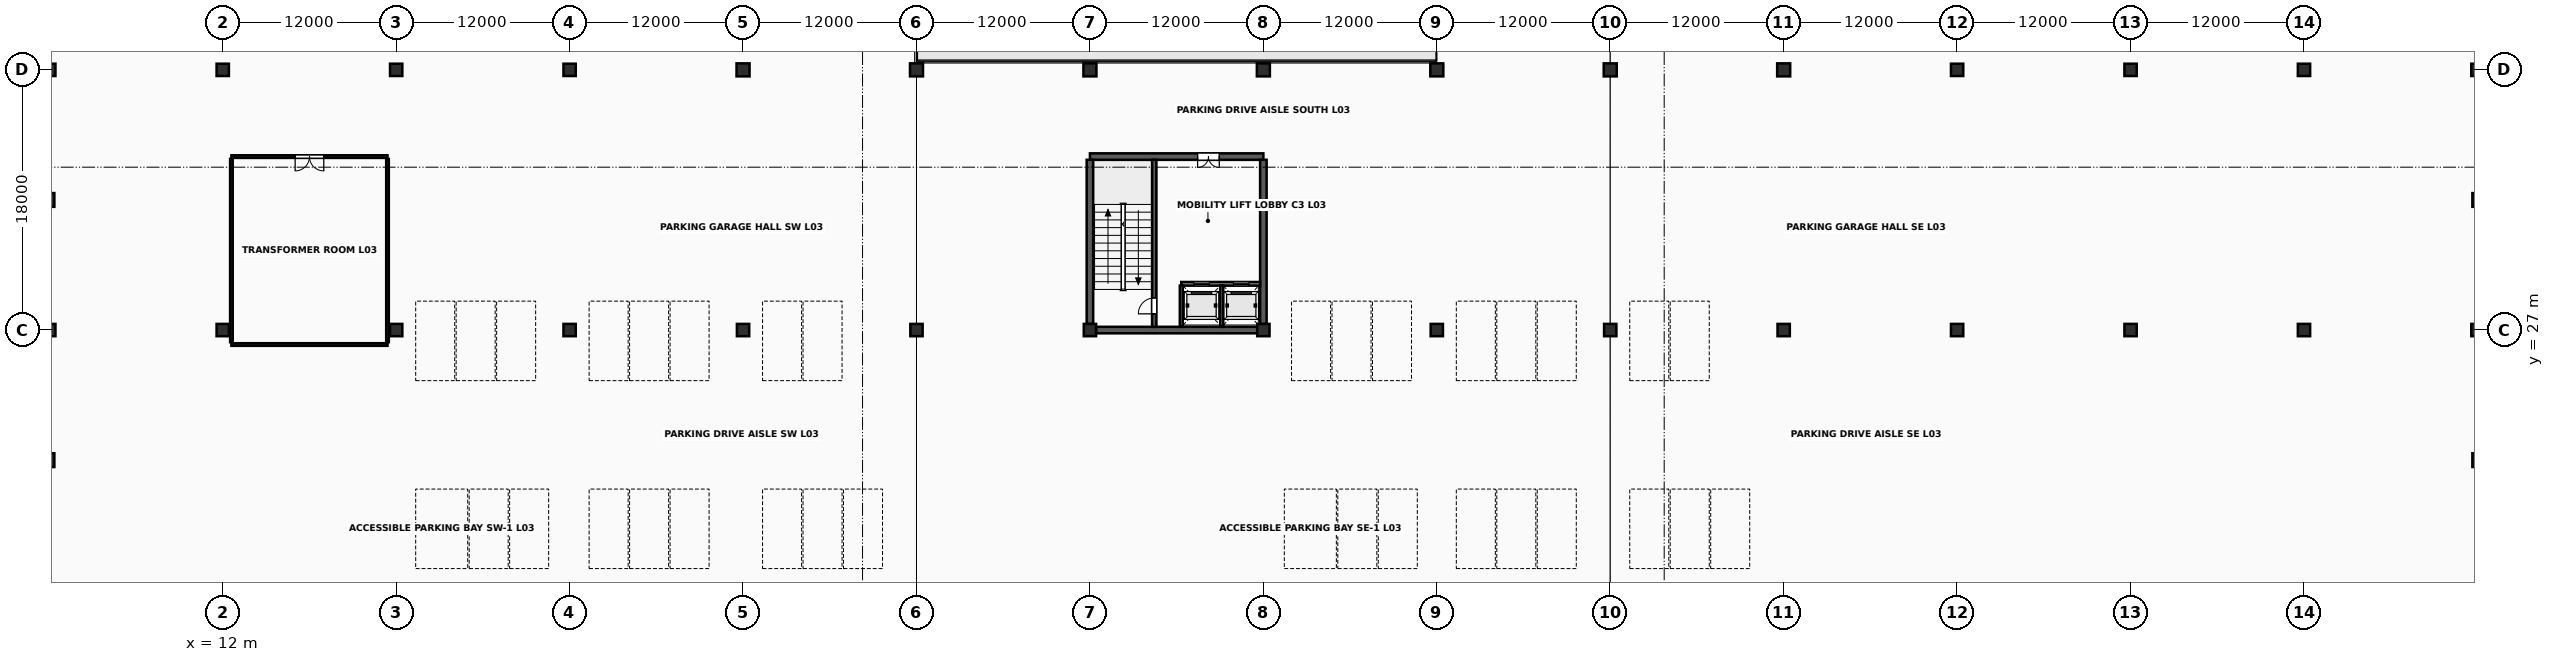
"""IFC4 building model, lengths in metres.
Left out: names, types, materials, properties, quantities, classifications, styles, units other than length and angle.
Written with IfcOpenShell. Run it as: python <this file> out.ifc"""

import sys

from ifc_helpers import new_model, si_unit, direction, frame, frame_2d, origin, origin_2d, place, context, subcontext, project, spatial, rectangle, extrude, element, fill, save


model = new_model("IFC4")
c1 = context("Model", 3, precision=1e-05, world=origin(), true_north=direction((0.0, 1.0)))
c2 = subcontext(c1, "Body", "Model", "MODEL_VIEW")
j1 = project(units=[si_unit("LENGTHUNIT", "METRE"), si_unit("PLANEANGLEUNIT", "RADIAN")], contexts=[c1])
p1 = place(None, origin())
s1 = spatial("IfcSite", under=j1, at=p1, CompositionType="ELEMENT")
p2 = place(p1, origin())
s2 = spatial("IfcBuilding", under=s1, at=p2, CompositionType="ELEMENT")
p3 = place(p2, frame((0.0, 0.0, 13.4)))
s3 = spatial("IfcBuildingStorey", under=s2, at=p3, CompositionType="ELEMENT", Elevation=13.4)
for number, where, z_axis, x_axis in (
    (1, (0.0, 27.0, 0.0), (0.0, 0.0, 1.0), (1.0, 0.0, 0.0)),
    (2, (0.0, 45.0, 0.0), (0.0, 0.0, 1.0), (1.0, 0.0, 0.0)),
    (3, (12.0, 27.0, 0.0), (0.0, 0.0, 1.0), (1.0, 0.0, 0.0)),
    (4, (12.0, 45.0, 0.0), (0.0, 0.0, 1.0), (1.0, 0.0, 0.0)),
    (5, (24.0, 27.0, 0.0), (0.0, 0.0, 1.0), (1.0, 0.0, 0.0)),
    (6, (24.0, 45.0, 0.0), (0.0, 0.0, 1.0), (1.0, 0.0, 0.0)),
    (7, (36.0, 27.0, 0.0), (0.0, 0.0, 1.0), (1.0, 0.0, 0.0)),
    (8, (36.0, 45.0, 0.0), (0.0, 0.0, 1.0), (1.0, 0.0, 0.0)),
    (9, (48.0, 27.0, 0.0), (0.0, 0.0, 1.0), (1.0, 0.0, 0.0)),
):
    element("IfcColumn", number, at=place(p3, frame(where, z_axis=z_axis, x_axis=x_axis)), inside=s3, PredefinedType="COLUMN", context=c2, shape_type="SweptSolid", body=[
        extrude(rectangle(XDim=0.85, YDim=0.85, at=origin_2d()), origin(), (0.0, 0.0, 1.0), 3.8),
    ])
p4 = place(p3, frame((48.0, 45.0, 0.0), z_axis=(0.0, 0.0, 1.0), x_axis=(1.0, 0.0, 0.0)))
e10 = element("IfcColumn", 10, at=p4, inside=s3, PredefinedType="COLUMN", context=c2, shape_type="SweptSolid", body=[
    extrude(rectangle(XDim=0.9, YDim=0.9, at=origin_2d()), origin(), (0.0, 0.0, 1.0), 3.8),
])
p5 = place(p3, frame((60.0, 27.0, 0.0), z_axis=(0.0, 0.0, 1.0), x_axis=(1.0, 0.0, 0.0)))
e11 = element("IfcColumn", 11, at=p5, inside=s3, PredefinedType="COLUMN", context=c2, shape_type="SweptSolid", body=[
    extrude(rectangle(XDim=0.85, YDim=0.85, at=origin_2d()), origin(), (0.0, 0.0, 1.0), 3.8),
])
p6 = place(p3, frame((60.0, 45.0, 0.0), z_axis=(0.0, 0.0, 1.0), x_axis=(1.0, 0.0, 0.0)))
e12 = element("IfcColumn", 12, at=p6, inside=s3, PredefinedType="COLUMN", context=c2, shape_type="SweptSolid", body=[
    extrude(rectangle(XDim=0.9, YDim=0.9, at=origin_2d()), origin(), (0.0, 0.0, 1.0), 3.8),
])
p7 = place(p3, frame((72.0, 27.0, 0.0), z_axis=(0.0, 0.0, 1.0), x_axis=(1.0, 0.0, 0.0)))
e13 = element("IfcColumn", 13, at=p7, inside=s3, PredefinedType="COLUMN", context=c2, shape_type="SweptSolid", body=[
    extrude(rectangle(XDim=0.85, YDim=0.85, at=origin_2d()), origin(), (0.0, 0.0, 1.0), 3.8),
])
p8 = place(p3, frame((72.0, 45.0, 0.0), z_axis=(0.0, 0.0, 1.0), x_axis=(1.0, 0.0, 0.0)))
e14 = element("IfcColumn", 14, at=p8, inside=s3, PredefinedType="COLUMN", context=c2, shape_type="SweptSolid", body=[
    extrude(rectangle(XDim=0.9, YDim=0.9, at=origin_2d()), origin(), (0.0, 0.0, 1.0), 3.8),
])
p9 = place(p3, frame((84.0, 27.0, 0.0), z_axis=(0.0, 0.0, 1.0), x_axis=(1.0, 0.0, 0.0)))
e15 = element("IfcColumn", 15, at=p9, inside=s3, PredefinedType="COLUMN", context=c2, shape_type="SweptSolid", body=[
    extrude(rectangle(XDim=0.85, YDim=0.85, at=origin_2d()), origin(), (0.0, 0.0, 1.0), 3.8),
])
p10 = place(p3, frame((84.0, 45.0, 0.0), z_axis=(0.0, 0.0, 1.0), x_axis=(1.0, 0.0, 0.0)))
e16 = element("IfcColumn", 16, at=p10, inside=s3, PredefinedType="COLUMN", context=c2, shape_type="SweptSolid", body=[
    extrude(rectangle(XDim=0.9, YDim=0.9, at=origin_2d()), origin(), (0.0, 0.0, 1.0), 3.8),
])
p11 = place(p3, frame((96.0, 27.0, 0.0), z_axis=(0.0, 0.0, 1.0), x_axis=(1.0, 0.0, 0.0)))
e17 = element("IfcColumn", 17, at=p11, inside=s3, PredefinedType="COLUMN", context=c2, shape_type="SweptSolid", body=[
    extrude(rectangle(XDim=0.85, YDim=0.85, at=origin_2d()), origin(), (0.0, 0.0, 1.0), 3.8),
])
p12 = place(p3, frame((96.0, 45.0, 0.0), z_axis=(0.0, 0.0, 1.0), x_axis=(1.0, 0.0, 0.0)))
e18 = element("IfcColumn", 18, at=p12, inside=s3, PredefinedType="COLUMN", context=c2, shape_type="SweptSolid", body=[
    extrude(rectangle(XDim=0.9, YDim=0.9, at=origin_2d()), origin(), (0.0, 0.0, 1.0), 3.8),
])
p13 = place(p3, frame((108.0, 27.0, 0.0), z_axis=(0.0, 0.0, 1.0), x_axis=(1.0, 0.0, 0.0)))
e19 = element("IfcColumn", 19, at=p13, inside=s3, PredefinedType="COLUMN", context=c2, shape_type="SweptSolid", body=[
    extrude(rectangle(XDim=0.85, YDim=0.85, at=origin_2d()), origin(), (0.0, 0.0, 1.0), 3.8),
])
p14 = place(p3, frame((108.0, 45.0, 0.0), z_axis=(0.0, 0.0, 1.0), x_axis=(1.0, 0.0, 0.0)))
e20 = element("IfcColumn", 20, at=p14, inside=s3, PredefinedType="COLUMN", context=c2, shape_type="SweptSolid", body=[
    extrude(rectangle(XDim=0.9, YDim=0.9, at=origin_2d()), origin(), (0.0, 0.0, 1.0), 3.8),
])
p15 = place(p3, frame((120.0, 27.0, 0.0), z_axis=(0.0, 0.0, 1.0), x_axis=(1.0, 0.0, 0.0)))
e21 = element("IfcColumn", 21, at=p15, inside=s3, PredefinedType="COLUMN", context=c2, shape_type="SweptSolid", body=[
    extrude(rectangle(XDim=0.85, YDim=0.85, at=origin_2d()), origin(), (0.0, 0.0, 1.0), 3.8),
])
p16 = place(p3, frame((120.0, 45.0, 0.0), z_axis=(0.0, 0.0, 1.0), x_axis=(1.0, 0.0, 0.0)))
e22 = element("IfcColumn", 22, at=p16, inside=s3, PredefinedType="COLUMN", context=c2, shape_type="SweptSolid", body=[
    extrude(rectangle(XDim=0.9, YDim=0.9, at=origin_2d()), origin(), (0.0, 0.0, 1.0), 3.8),
])
for number, where, z_axis, x_axis in (
    (23, (132.0, 27.0, 0.0), (0.0, 0.0, 1.0), (1.0, 0.0, 0.0)),
    (24, (132.0, 45.0, 0.0), (0.0, 0.0, 1.0), (1.0, 0.0, 0.0)),
    (25, (144.0, 27.0, 0.0), (0.0, 0.0, 1.0), (1.0, 0.0, 0.0)),
    (26, (144.0, 45.0, 0.0), (0.0, 0.0, 1.0), (1.0, 0.0, 0.0)),
    (27, (156.0, 27.0, 0.0), (0.0, 0.0, 1.0), (1.0, 0.0, 0.0)),
    (28, (156.0, 45.0, 0.0), (0.0, 0.0, 1.0), (1.0, 0.0, 0.0)),
    (29, (168.0, 27.0, 0.0), (0.0, 0.0, 1.0), (1.0, 0.0, 0.0)),
    (30, (168.0, 45.0, 0.0), (0.0, 0.0, 1.0), (1.0, 0.0, 0.0)),
):
    element("IfcColumn", number, at=place(p3, frame(where, z_axis=z_axis, x_axis=x_axis)), inside=s3, PredefinedType="COLUMN", context=c2, shape_type="SweptSolid", body=[
        extrude(rectangle(XDim=0.85, YDim=0.85, at=origin_2d()), origin(), (0.0, 0.0, 1.0), 3.8),
    ])
for number, where, z_axis, x_axis in (
    (31, (0.0, 18.0, 0.0), (0.0, 0.0, 1.0), (1.0, 0.0, 0.0)),
    (32, (0.0, 36.0, 0.0), (0.0, 0.0, 1.0), (1.0, 0.0, 0.0)),
    (33, (168.0, 18.0, 0.0), (0.0, 0.0, 1.0), (1.0, 0.0, 0.0)),
    (34, (168.0, 36.0, 0.0), (0.0, 0.0, 1.0), (1.0, 0.0, 0.0)),
):
    element("IfcColumn", number, at=place(p3, frame(where, z_axis=z_axis, x_axis=x_axis)), inside=s3, PredefinedType="PILASTER", context=c2, shape_type="SweptSolid", body=[
        extrude(rectangle(XDim=0.7, YDim=0.95, at=origin_2d()), origin(), (0.0, 0.0, 1.0), 3.8),
    ])
p17 = place(p3, frame((72.422, 27.0, 0.0), z_axis=(0.0, 0.0, 1.0), x_axis=(1.0, 0.0, 0.0)))
e35 = element("IfcWall", 35, at=p17, inside=s3, PredefinedType="SHEAR", context=c2, shape_type="SweptSolid", body=[
    extrude(rectangle(XDim=11.156, YDim=0.45, at=frame_2d((5.578, 0.0))), origin(), (0.0, 0.0, 1.0), 3.618),
])
p18 = place(p3, frame((72.0, 39.0, 0.0), z_axis=(0.0, 0.0, 1.0), x_axis=(1.0, 0.0, 0.0)))
e36 = element("IfcWall", 36, at=p18, inside=s3, PredefinedType="SHEAR", context=c2, shape_type="SweptSolid", body=[
    extrude(rectangle(XDim=12.0, YDim=0.45, at=frame_2d((6.0, 0.0))), origin(), (0.0, 0.0, 1.0), 3.618),
])
p19 = place(p18, frame((7.45, 0.0, 0.0)))
e37 = element("IfcOpeningElement", 37, at=p19, cuts=e36, PredefinedType="OPENING", context=c2, shape_type="SweptSolid", body=[
    extrude(rectangle(XDim=1.5, YDim=2.25, at=frame_2d((0.75, 1.125))), frame((0.0, 0.24, 0.0), z_axis=(0.0, -1.0, 0.0), x_axis=(1.0, 0.0, 0.0)), (0.0, 0.0, 1.0), 0.48),
])
for number, where, z_axis, x_axis in (
    (38, (72.0, 27.422, 0.0), (0.0, 0.0, 1.0), (0.0, 1.0, 0.0)),
    (39, (84.0, 27.422, 0.0), (0.0, 0.0, 1.0), (0.0, 1.0, 0.0)),
):
    element("IfcWall", number, at=place(p3, frame(where, z_axis=z_axis, x_axis=x_axis)), inside=s3, PredefinedType="SHEAR", context=c2, shape_type="SweptSolid", body=[
        extrude(rectangle(XDim=11.356, YDim=0.45, at=frame_2d((5.678, 0.0))), origin(), (0.0, 0.0, 1.0), 3.618),
    ])
p20 = place(p3, frame((76.45, 27.222, 0.0), z_axis=(0.0, 0.0, 1.0), x_axis=(0.0, 1.0, 0.0)))
e40 = element("IfcWall", 40, at=p20, inside=s3, PredefinedType="SHEAR", context=c2, shape_type="SweptSolid", body=[
    extrude(rectangle(XDim=11.556, YDim=0.3, at=frame_2d((5.778, 0.0))), origin(), (0.0, 0.0, 1.0), 3.618),
])
p21 = place(p20, frame((0.9, 0.0, 0.0)))
e41 = element("IfcOpeningElement", 41, at=p21, cuts=e40, PredefinedType="OPENING", context=c2, shape_type="SweptSolid", body=[
    extrude(rectangle(XDim=1.1, YDim=2.2, at=frame_2d((0.55, 1.1))), frame((0.0, 0.165, 0.0), z_axis=(0.0, -1.0, 0.0), x_axis=(1.0, 0.0, 0.0)), (0.0, 0.0, 1.0), 0.33),
])
p22 = place(p3, frame((78.32, 30.2, 0.0), z_axis=(0.0, 0.0, 1.0), x_axis=(1.0, 0.0, 0.0)))
e42 = element("IfcWall", 42, at=p22, inside=s3, PredefinedType="SOLIDWALL", context=c2, shape_type="SweptSolid", body=[
    extrude(rectangle(XDim=5.458, YDim=0.25, at=frame_2d((2.729, 0.0))), origin(), (0.0, 0.0, 1.0), 3.618),
])
p23 = place(p22, frame((0.86, 0.0, 0.0)))
e43 = element("IfcOpeningElement", 43, at=p23, cuts=e42, PredefinedType="OPENING", context=c2, shape_type="SweptSolid", body=[
    extrude(rectangle(XDim=1.08, YDim=2.22, at=frame_2d((0.54, 1.11))), frame((0.0, 0.14, 0.0), z_axis=(0.0, -1.0, 0.0), x_axis=(1.0, 0.0, 0.0)), (0.0, 0.0, 1.0), 0.28),
])
p24 = place(p22, frame((3.61, 0.0, 0.0)))
e44 = element("IfcOpeningElement", 44, at=p24, cuts=e42, PredefinedType="OPENING", context=c2, shape_type="SweptSolid", body=[
    extrude(rectangle(XDim=1.08, YDim=2.22, at=frame_2d((0.54, 1.11))), frame((0.0, 0.14, 0.0), z_axis=(0.0, -1.0, 0.0), x_axis=(1.0, 0.0, 0.0)), (0.0, 0.0, 1.0), 0.28),
])
for number, where, z_axis, x_axis in (
    (45, (78.32, 27.225, 0.0), (0.0, 0.0, 1.0), (0.0, 1.0, 0.0)),
    (46, (81.12, 27.225, 0.0), (0.0, 0.0, 1.0), (0.0, 1.0, 0.0)),
):
    element("IfcWall", number, at=place(p3, frame(where, z_axis=z_axis, x_axis=x_axis)), inside=s3, PredefinedType="SOLIDWALL", context=c2, shape_type="SweptSolid", body=[
        extrude(rectangle(XDim=2.855, YDim=0.2, at=frame_2d((1.427, 0.0))), origin(), (0.0, 0.0, 1.0), 3.608),
    ])
p25 = place(p3, frame((12.6, 26.0, 0.0), z_axis=(0.0, 0.0, 1.0), x_axis=(1.0, 0.0, 0.0)))
e47 = element("IfcWall", 47, at=p25, inside=s3, PredefinedType="SOLIDWALL", context=c2, shape_type="SweptSolid", body=[
    extrude(rectangle(XDim=10.8, YDim=0.18, at=frame_2d((5.4, 0.0))), origin(), (0.0, 0.0, 1.0), 2.75),
])
p26 = place(p3, frame((12.6, 39.0, 0.0), z_axis=(0.0, 0.0, 1.0), x_axis=(1.0, 0.0, 0.0)))
e48 = element("IfcWall", 48, at=p26, inside=s3, PredefinedType="SOLIDWALL", context=c2, shape_type="SweptSolid", body=[
    extrude(rectangle(XDim=10.8, YDim=0.18, at=frame_2d((5.4, 0.0))), origin(), (0.0, 0.0, 1.0), 2.75),
])
p27 = place(p26, frame((4.41, 0.0, 0.0)))
e49 = element("IfcOpeningElement", 49, at=p27, cuts=e48, PredefinedType="OPENING", context=c2, shape_type="SweptSolid", body=[
    extrude(rectangle(XDim=1.98, YDim=2.4, at=frame_2d((0.99, 1.2))), frame((0.0, 0.105, 0.0), z_axis=(0.0, -1.0, 0.0), x_axis=(1.0, 0.0, 0.0)), (0.0, 0.0, 1.0), 0.21),
])
for number, where, z_axis, x_axis in (
    (50, (12.6, 26.16, 0.0), (0.0, 0.0, 1.0), (0.0, 1.0, 0.0)),
    (51, (23.4, 26.16, 0.0), (0.0, 0.0, 1.0), (0.0, 1.0, 0.0)),
):
    element("IfcWall", number, at=place(p3, frame(where, z_axis=z_axis, x_axis=x_axis)), inside=s3, PredefinedType="SOLIDWALL", context=c2, shape_type="SweptSolid", body=[
        extrude(rectangle(XDim=12.68, YDim=0.18, at=frame_2d((6.34, 0.0))), origin(), (0.0, 0.0, 1.0), 2.75),
    ])
p28 = place(p21, origin())
e52 = element("IfcDoor", 52, at=p28, inside=s3, OperationType="SINGLE_SWING_LEFT", PredefinedType="DOOR", context=c2, shape_type="SweptSolid", body=[
    extrude(rectangle(XDim=1.1, YDim=2.2, at=frame_2d((0.55, 1.1))), frame((0.0, 0.025, 0.0), z_axis=(0.0, -1.0, 0.0), x_axis=(1.0, 0.0, 0.0)), (0.0, 0.0, 1.0), 0.05),
])
fill(e41, e52)
p29 = place(p19, origin())
e53 = element("IfcDoor", 53, at=p29, inside=s3, OperationType="DOUBLE_DOOR_SINGLE_SWING", PredefinedType="DOOR", context=c2, shape_type="SweptSolid", body=[
    extrude(rectangle(XDim=1.5, YDim=2.25, at=frame_2d((0.75, 1.125))), frame((0.0, 0.025, 0.0), z_axis=(0.0, -1.0, 0.0), x_axis=(1.0, 0.0, 0.0)), (0.0, 0.0, 1.0), 0.05),
])
fill(e37, e53)
p30 = place(p23, origin())
e54 = element("IfcDoor", 54, at=p30, inside=s3, OperationType="SLIDING_TO_LEFT", PredefinedType="USERDEFINED", context=c2, shape_type="SweptSolid", body=[
    extrude(rectangle(XDim=1.08, YDim=2.22, at=frame_2d((0.54, 1.11))), frame((0.0, 0.025, 0.0), z_axis=(0.0, -1.0, 0.0), x_axis=(1.0, 0.0, 0.0)), (0.0, 0.0, 1.0), 0.05),
])
fill(e43, e54)
p31 = place(p24, origin())
e55 = element("IfcDoor", 55, at=p31, inside=s3, OperationType="SLIDING_TO_LEFT", PredefinedType="USERDEFINED", context=c2, shape_type="SweptSolid", body=[
    extrude(rectangle(XDim=1.08, YDim=2.22, at=frame_2d((0.54, 1.11))), frame((0.0, 0.025, 0.0), z_axis=(0.0, -1.0, 0.0), x_axis=(1.0, 0.0, 0.0)), (0.0, 0.0, 1.0), 0.05),
])
fill(e44, e55)
p32 = place(p27, origin())
e56 = element("IfcDoor", 56, at=p32, inside=s3, OperationType="DOUBLE_DOOR_SINGLE_SWING", PredefinedType="DOOR", context=c2, shape_type="SweptSolid", body=[
    extrude(rectangle(XDim=1.98, YDim=2.4, at=frame_2d((0.99, 1.2))), frame((0.0, 0.025, 0.0), z_axis=(0.0, -1.0, 0.0), x_axis=(1.0, 0.0, 0.0)), (0.0, 0.0, 1.0), 0.05),
])
fill(e49, e56)
save(model, sys.argv[1])
